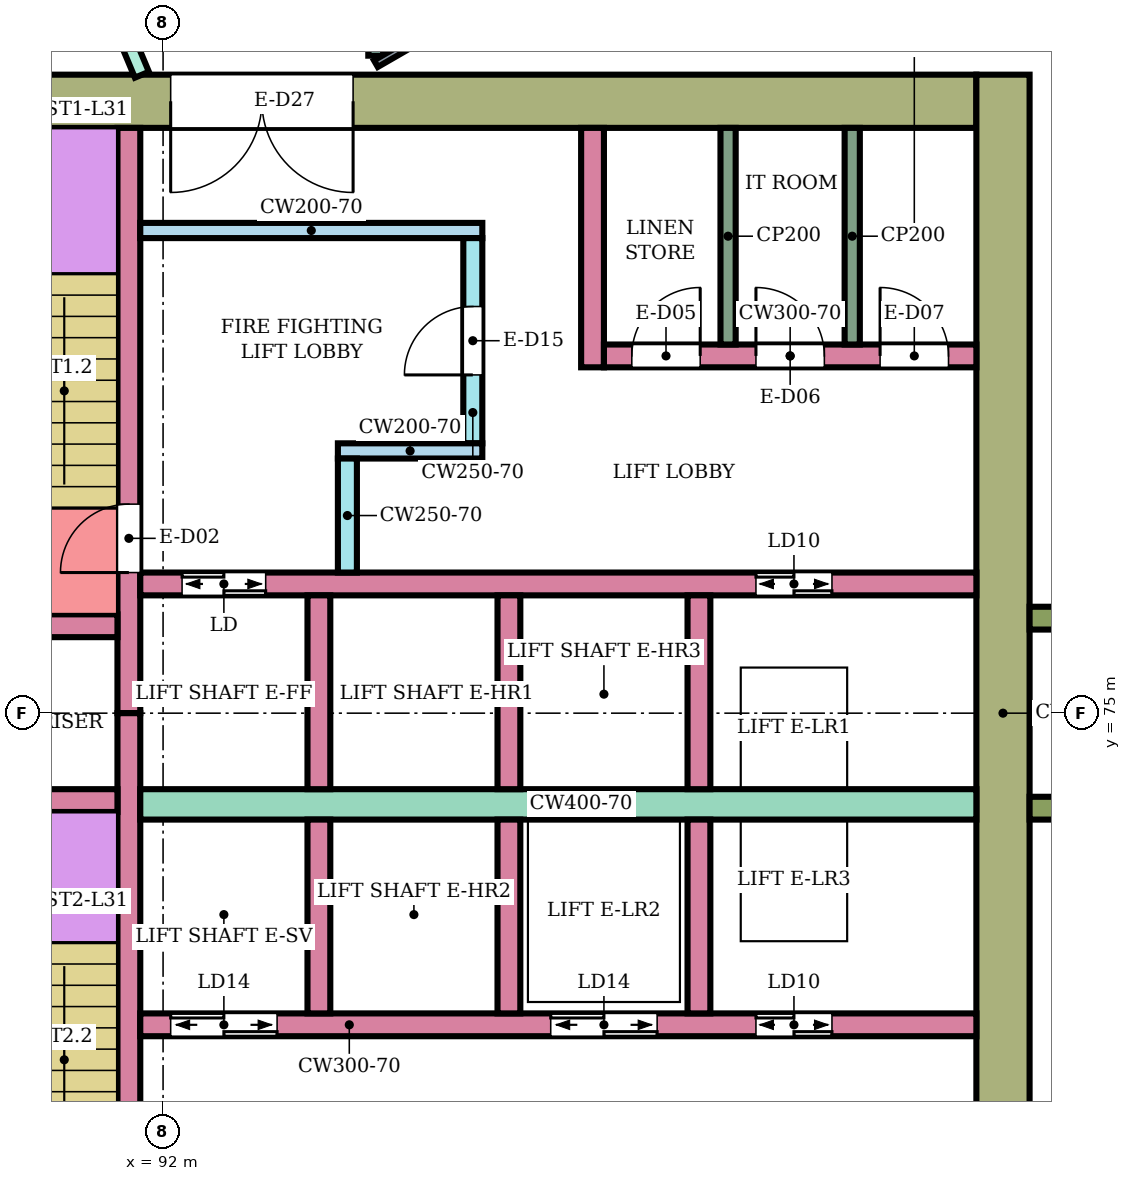
"""IFC4 building model, lengths in metres.
Left out: names, types, materials, properties, quantities, classifications, styles, units other than length and angle.
Written with IfcOpenShell. Run it as: python <this file> out.ifc"""

import sys

from ifc_helpers import new_model, si_unit, direction, frame, frame_2d, origin, place, context, subcontext, project, spatial, rectangle, extrude, element, fill, save


model = new_model("IFC4")
c1 = context("Model", 3, precision=1e-05, world=origin(), true_north=direction((0.0, 1.0)))
c2 = subcontext(c1, "Body", "Model", "MODEL_VIEW")
j1 = project(units=[si_unit("LENGTHUNIT", "METRE"), si_unit("PLANEANGLEUNIT", "RADIAN")], contexts=[c1])
p1 = place(None, origin())
s1 = spatial("IfcSite", under=j1, at=p1, CompositionType="ELEMENT")
p2 = place(p1, origin())
s2 = spatial("IfcBuilding", under=s1, at=p2, CompositionType="ELEMENT")
p3 = place(p2, frame((0.0, 0.0, 134.1)))
s3 = spatial("IfcBuildingStorey", under=s2, at=p3, CompositionType="ELEMENT", Elevation=134.1)
p4 = place(p3, frame((87.9, 83.05, 0.0), z_axis=(0.0, 0.0, 1.0), x_axis=(1.0, 0.0, 0.0)))
e1 = element("IfcWall", 1, at=p4, inside=s3, PredefinedType="SHEAR", context=c2, shape_type="SweptSolid", body=[
    extrude(rectangle(XDim=14.8, YDim=0.7, at=frame_2d((7.4, 0.0))), origin(), (0.0, 0.0, 1.0), 3.58),
])
p5 = place(p4, frame((4.2, 0.0, 0.0)))
e2 = element("IfcOpeningElement", 2, at=p5, cuts=e1, PredefinedType="OPENING", context=c2, shape_type="SweptSolid", body=[
    extrude(rectangle(XDim=2.4, YDim=2.4, at=frame_2d((1.2, 1.2))), frame((0.0, 0.36, 0.0), z_axis=(0.0, -1.0, 0.0), x_axis=(1.0, 0.0, 0.0)), (0.0, 0.0, 1.0), 0.72),
])
p6 = place(p3, frame((103.05, 66.6, 0.0), z_axis=(0.0, 0.0, 1.0), x_axis=(0.0, 1.0, 0.0)))
e3 = element("IfcWall", 3, at=p6, inside=s3, PredefinedType="SHEAR", context=c2, shape_type="SweptSolid", body=[
    extrude(rectangle(XDim=16.8, YDim=0.7, at=frame_2d((8.4, 0.0))), origin(), (0.0, 0.0, 1.0), 3.58),
])
p7 = place(p3, frame((91.55, 75.0, 0.0), z_axis=(0.0, 0.0, 1.0), x_axis=(0.0, 1.0, 0.0)))
e4 = element("IfcWall", 4, at=p7, inside=s3, PredefinedType="SHEAR", context=c2, shape_type="SweptSolid", body=[
    extrude(rectangle(XDim=7.7, YDim=0.3, at=frame_2d((3.85, 0.0))), origin(), (0.0, 0.0, 1.0), 3.58),
])
p8 = place(p7, frame((1.85, 0.0, 0.0)))
e5 = element("IfcOpeningElement", 5, at=p8, cuts=e4, PredefinedType="OPENING", context=c2, shape_type="SweptSolid", body=[
    extrude(rectangle(XDim=0.9, YDim=2.1, at=frame_2d((0.45, 1.05))), frame((0.0, 0.16, 0.0), z_axis=(0.0, -1.0, 0.0), x_axis=(1.0, 0.0, 0.0)), (0.0, 0.0, 1.0), 0.32),
])
p9 = place(p3, frame((91.55, 67.3, 0.0), z_axis=(0.0, 0.0, 1.0), x_axis=(0.0, 1.0, 0.0)))
e6 = element("IfcWall", 6, at=p9, inside=s3, PredefinedType="SHEAR", context=c2, shape_type="SweptSolid", body=[
    extrude(rectangle(XDim=7.7, YDim=0.3, at=frame_2d((3.85, 0.0))), origin(), (0.0, 0.0, 1.0), 3.58),
])
p10 = place(p9, frame((0.35, 0.0, 0.0)))
e7 = element("IfcOpeningElement", 7, at=p10, cuts=e6, PredefinedType="OPENING", context=c2, shape_type="SweptSolid", body=[
    extrude(rectangle(XDim=0.9, YDim=2.1, at=frame_2d((0.45, 1.05))), frame((0.0, 0.16, 0.0), z_axis=(0.0, -1.0, 0.0), x_axis=(1.0, 0.0, 0.0)), (0.0, 0.0, 1.0), 0.32),
])
p11 = place(p3, frame((88.35, 76.15, 0.0), z_axis=(0.0, 0.0, 1.0), x_axis=(1.0, 0.0, 0.0)))
e8 = element("IfcWall", 8, at=p11, inside=s3, PredefinedType="SHEAR", context=c2, shape_type="SweptSolid", body=[
    extrude(rectangle(XDim=3.05, YDim=0.3, at=frame_2d((1.525, 0.0))), origin(), (0.0, 0.0, 1.0), 3.58),
])
p12 = place(p11, frame((1.1, 0.0, 0.0)))
e9 = element("IfcOpeningElement", 9, at=p12, cuts=e8, PredefinedType="OPENING", context=c2, shape_type="SweptSolid", body=[
    extrude(rectangle(XDim=0.7, YDim=2.0, at=frame_2d((0.35, 1.0))), frame((0.0, 0.16, 0.0), z_axis=(0.0, -1.0, 0.0), x_axis=(1.0, 0.0, 0.0)), (0.0, 0.0, 1.0), 0.32),
])
p13 = place(p3, frame((88.35, 73.85, 0.0), z_axis=(0.0, 0.0, 1.0), x_axis=(1.0, 0.0, 0.0)))
e10 = element("IfcWall", 10, at=p13, inside=s3, PredefinedType="SHEAR", context=c2, shape_type="SweptSolid", body=[
    extrude(rectangle(XDim=3.05, YDim=0.3, at=frame_2d((1.525, 0.0))), origin(), (0.0, 0.0, 1.0), 3.58),
])
p14 = place(p3, frame((91.7, 76.7, 0.0), z_axis=(0.0, 0.0, 1.0), x_axis=(1.0, 0.0, 0.0)))
e11 = element("IfcWall", 11, at=p14, inside=s3, PredefinedType="SHEAR", context=c2, shape_type="SweptSolid", body=[
    extrude(rectangle(XDim=11.0, YDim=0.3, at=frame_2d((5.5, 0.0))), origin(), (0.0, 0.0, 1.0), 3.58),
])
p15 = place(p14, frame((0.55, 0.0, 0.0)))
e12 = element("IfcOpeningElement", 12, at=p15, cuts=e11, PredefinedType="OPENING", context=c2, shape_type="SweptSolid", body=[
    extrude(rectangle(XDim=1.1, YDim=2.1, at=frame_2d((0.55, 1.05))), frame((0.0, 0.16, 0.0), z_axis=(0.0, -1.0, 0.0), x_axis=(1.0, 0.0, 0.0)), (0.0, 0.0, 1.0), 0.32),
])
p16 = place(p14, frame((8.1, 0.0, 0.0)))
e13 = element("IfcOpeningElement", 13, at=p16, cuts=e11, PredefinedType="OPENING", context=c2, shape_type="SweptSolid", body=[
    extrude(rectangle(XDim=1.0, YDim=2.1, at=frame_2d((0.5, 1.05))), frame((0.0, 0.16, 0.0), z_axis=(0.0, -1.0, 0.0), x_axis=(1.0, 0.0, 0.0)), (0.0, 0.0, 1.0), 0.32),
])
p17 = place(p3, frame((91.7, 73.8, 0.0), z_axis=(0.0, 0.0, 1.0), x_axis=(1.0, 0.0, 0.0)))
e14 = element("IfcWall", 14, at=p17, inside=s3, PredefinedType="SHEAR", context=c2, shape_type="SweptSolid", body=[
    extrude(rectangle(XDim=11.0, YDim=0.4, at=frame_2d((5.5, 0.0))), origin(), (0.0, 0.0, 1.0), 3.58),
])
p18 = place(p3, frame((91.7, 70.9, 0.0), z_axis=(0.0, 0.0, 1.0), x_axis=(1.0, 0.0, 0.0)))
e15 = element("IfcWall", 15, at=p18, inside=s3, PredefinedType="SHEAR", context=c2, shape_type="SweptSolid", body=[
    extrude(rectangle(XDim=11.0, YDim=0.3, at=frame_2d((5.5, 0.0))), origin(), (0.0, 0.0, 1.0), 3.58),
])
p19 = place(p18, frame((0.4, 0.0, 0.0)))
e16 = element("IfcOpeningElement", 16, at=p19, cuts=e15, PredefinedType="OPENING", context=c2, shape_type="SweptSolid", body=[
    extrude(rectangle(XDim=1.4, YDim=2.1, at=frame_2d((0.7, 1.05))), frame((0.0, 0.16, 0.0), z_axis=(0.0, -1.0, 0.0), x_axis=(1.0, 0.0, 0.0)), (0.0, 0.0, 1.0), 0.32),
])
p20 = place(p18, frame((5.4, 0.0, 0.0)))
e17 = element("IfcOpeningElement", 17, at=p20, cuts=e15, PredefinedType="OPENING", context=c2, shape_type="SweptSolid", body=[
    extrude(rectangle(XDim=1.4, YDim=2.1, at=frame_2d((0.7, 1.05))), frame((0.0, 0.16, 0.0), z_axis=(0.0, -1.0, 0.0), x_axis=(1.0, 0.0, 0.0)), (0.0, 0.0, 1.0), 0.32),
])
p21 = place(p18, frame((8.1, 0.0, 0.0)))
e18 = element("IfcOpeningElement", 18, at=p21, cuts=e15, PredefinedType="OPENING", context=c2, shape_type="SweptSolid", body=[
    extrude(rectangle(XDim=1.0, YDim=2.1, at=frame_2d((0.5, 1.05))), frame((0.0, 0.16, 0.0), z_axis=(0.0, -1.0, 0.0), x_axis=(1.0, 0.0, 0.0)), (0.0, 0.0, 1.0), 0.32),
])
for number, where, z_axis, x_axis in (
    (19, (94.05, 74.0, 0.0), (0.0, 0.0, 1.0), (0.0, 1.0, 0.0)),
    (20, (96.55, 74.0, 0.0), (0.0, 0.0, 1.0), (0.0, 1.0, 0.0)),
    (21, (99.05, 74.0, 0.0), (0.0, 0.0, 1.0), (0.0, 1.0, 0.0)),
    (22, (94.05, 71.05, 0.0), (0.0, 0.0, 1.0), (0.0, 1.0, 0.0)),
    (23, (96.55, 71.05, 0.0), (0.0, 0.0, 1.0), (0.0, 1.0, 0.0)),
    (24, (99.05, 71.05, 0.0), (0.0, 0.0, 1.0), (0.0, 1.0, 0.0)),
):
    element("IfcWall", number, at=place(p3, frame(where, z_axis=z_axis, x_axis=x_axis)), inside=s3, PredefinedType="SHEAR", context=c2, shape_type="SweptSolid", body=[
        extrude(rectangle(XDim=2.55, YDim=0.3, at=frame_2d((1.275, 0.0))), origin(), (0.0, 0.0, 1.0), 3.58),
    ])
p22 = place(p3, frame((91.7, 81.35, 0.0), z_axis=(0.0, 0.0, 1.0), x_axis=(1.0, 0.0, 0.0)))
e25 = element("IfcWall", 25, at=p22, inside=s3, PredefinedType="SHEAR", context=c2, shape_type="SweptSolid", body=[
    extrude(rectangle(XDim=4.5, YDim=0.2, at=frame_2d((2.25, 0.0))), origin(), (0.0, 0.0, 1.0), 3.58),
])
p23 = place(p3, frame((96.075, 78.55, 0.0), z_axis=(0.0, 0.0, 1.0), x_axis=(0.0, 1.0, 0.0)))
e26 = element("IfcWall", 26, at=p23, inside=s3, PredefinedType="SHEAR", context=c2, shape_type="SweptSolid", body=[
    extrude(rectangle(XDim=2.7, YDim=0.25, at=frame_2d((1.35, 0.0))), origin(), (0.0, 0.0, 1.0), 3.58),
])
p24 = place(p23, frame((0.9, 0.0, 0.0)))
e27 = element("IfcOpeningElement", 27, at=p24, cuts=e26, PredefinedType="OPENING", context=c2, shape_type="SweptSolid", body=[
    extrude(rectangle(XDim=0.9, YDim=2.1, at=frame_2d((0.45, 1.05))), frame((0.0, 0.135, 0.0), z_axis=(0.0, -1.0, 0.0), x_axis=(1.0, 0.0, 0.0)), (0.0, 0.0, 1.0), 0.27),
])
p25 = place(p3, frame((94.3, 78.45, 0.0), z_axis=(0.0, 0.0, 1.0), x_axis=(1.0, 0.0, 0.0)))
e28 = element("IfcWall", 28, at=p25, inside=s3, PredefinedType="SHEAR", context=c2, shape_type="SweptSolid", body=[
    extrude(rectangle(XDim=1.9, YDim=0.2, at=frame_2d((0.95, 0.0))), origin(), (0.0, 0.0, 1.0), 3.58),
])
p26 = place(p3, frame((94.425, 76.85, 0.0), z_axis=(0.0, 0.0, 1.0), x_axis=(0.0, 1.0, 0.0)))
e29 = element("IfcWall", 29, at=p26, inside=s3, PredefinedType="SHEAR", context=c2, shape_type="SweptSolid", body=[
    extrude(rectangle(XDim=1.5, YDim=0.25, at=frame_2d((0.75, 0.0))), origin(), (0.0, 0.0, 1.0), 3.58),
])
p27 = place(p3, frame((97.65, 79.55, 0.0), z_axis=(0.0, 0.0, 1.0), x_axis=(0.0, 1.0, 0.0)))
e30 = element("IfcWall", 30, at=p27, inside=s3, PredefinedType="SHEAR", context=c2, shape_type="SweptSolid", body=[
    extrude(rectangle(XDim=3.15, YDim=0.3, at=frame_2d((1.575, 0.0))), origin(), (0.0, 0.0, 1.0), 3.58),
])
p28 = place(p3, frame((97.8, 79.7, 0.0), z_axis=(0.0, 0.0, 1.0), x_axis=(1.0, 0.0, 0.0)))
e31 = element("IfcWall", 31, at=p28, inside=s3, PredefinedType="SHEAR", context=c2, shape_type="SweptSolid", body=[
    extrude(rectangle(XDim=4.9, YDim=0.3, at=frame_2d((2.45, 0.0))), origin(), (0.0, 0.0, 1.0), 3.58),
])
p29 = place(p28, frame((0.367, 0.0, 0.0)))
e32 = element("IfcOpeningElement", 32, at=p29, cuts=e31, PredefinedType="OPENING", context=c2, shape_type="SweptSolid", body=[
    extrude(rectangle(XDim=0.9, YDim=2.1, at=frame_2d((0.45, 1.05))), frame((0.0, 0.16, 0.0), z_axis=(0.0, -1.0, 0.0), x_axis=(1.0, 0.0, 0.0)), (0.0, 0.0, 1.0), 0.32),
])
p30 = place(p28, frame((2.0, 0.0, 0.0)))
e33 = element("IfcOpeningElement", 33, at=p30, cuts=e31, PredefinedType="OPENING", context=c2, shape_type="SweptSolid", body=[
    extrude(rectangle(XDim=0.9, YDim=2.1, at=frame_2d((0.45, 1.05))), frame((0.0, 0.16, 0.0), z_axis=(0.0, -1.0, 0.0), x_axis=(1.0, 0.0, 0.0)), (0.0, 0.0, 1.0), 0.32),
])
p31 = place(p28, frame((3.633, 0.0, 0.0)))
e34 = element("IfcOpeningElement", 34, at=p31, cuts=e31, PredefinedType="OPENING", context=c2, shape_type="SweptSolid", body=[
    extrude(rectangle(XDim=0.9, YDim=2.1, at=frame_2d((0.45, 1.05))), frame((0.0, 0.16, 0.0), z_axis=(0.0, -1.0, 0.0), x_axis=(1.0, 0.0, 0.0)), (0.0, 0.0, 1.0), 0.32),
])
for number, where, z_axis, x_axis in (
    (35, (103.4, 73.75, 0.0), (0.0, 0.0, 1.0), (1.0, 0.0, 0.0)),
    (36, (103.4, 76.25, 0.0), (0.0, 0.0, 1.0), (1.0, 0.0, 0.0)),
):
    element("IfcWall", number, at=place(p3, frame(where, z_axis=z_axis, x_axis=x_axis)), inside=s3, PredefinedType="NOTDEFINED", context=c2, shape_type="SweptSolid", body=[
        extrude(rectangle(XDim=2.416, YDim=0.3, at=frame_2d((1.208, 0.0))), origin(), (0.0, 0.0, 1.0), 3.9),
    ])
p32 = place(p3, frame((88.698, 90.624, 0.0), z_axis=(0.0, 0.0, 1.0), x_axis=(0.386027055918, -0.922487459047, 0.0)))
e37 = element("IfcWall", 37, at=p32, inside=s3, PredefinedType="PARTITIONING", context=c2, shape_type="SweptSolid", body=[
    extrude(rectangle(XDim=7.832, YDim=0.2, at=frame_2d((3.916, 0.0))), origin(), (0.0, 0.0, 1.0), 3.45),
])
p33 = place(p32, frame((1.482, 0.0, 0.0)))
e38 = element("IfcOpeningElement", 38, at=p33, cuts=e37, PredefinedType="OPENING", context=c2, shape_type="SweptSolid", body=[
    extrude(rectangle(XDim=1.0, YDim=2.1, at=frame_2d((0.5, 1.05))), frame((0.0, 0.11, 0.0), z_axis=(0.0, -1.0, 0.0), x_axis=(1.0, 0.0, 0.0)), (0.0, 0.0, 1.0), 0.22),
])
p34 = place(p3, frame((94.8, 83.65, 0.0), z_axis=(0.0, 0.0, 1.0), x_axis=(0.0, 1.0, 0.0)))
e39 = element("IfcWall", 39, at=p34, inside=s3, PredefinedType="PARTITIONING", context=c2, shape_type="SweptSolid", body=[
    extrude(rectangle(XDim=1.25, YDim=0.2, at=frame_2d((0.625, 0.0))), origin(), (0.0, 0.0, 1.0), 3.45),
])
p35 = place(p34, frame((0.062, 0.0, 0.0)))
e40 = element("IfcOpeningElement", 40, at=p35, cuts=e39, PredefinedType="OPENING", context=c2, shape_type="SweptSolid", body=[
    extrude(rectangle(XDim=1.0, YDim=2.1, at=frame_2d((0.5, 1.05))), frame((0.0, 0.11, 0.0), z_axis=(0.0, -1.0, 0.0), x_axis=(1.0, 0.0, 0.0)), (0.0, 0.0, 1.0), 0.22),
])
p36 = place(p3, frame((94.8, 83.545, 0.0), z_axis=(0.0, 0.0, 1.0), x_axis=(0.86602264145, 0.500004784474, 0.0)))
e41 = element("IfcWall", 41, at=p36, inside=s3, PredefinedType="PARTITIONING", context=c2, shape_type="SweptSolid", body=[
    extrude(rectangle(XDim=8.708, YDim=0.1, at=frame_2d((4.354, 0.0))), origin(), (0.0, 0.0, 1.0), 3.45),
])
p37 = place(p36, frame((3.879, 0.0, 0.0)))
e42 = element("IfcOpeningElement", 42, at=p37, cuts=e41, PredefinedType="OPENING", context=c2, shape_type="SweptSolid", body=[
    extrude(rectangle(XDim=0.9, YDim=2.1, at=frame_2d((0.45, 1.05))), frame((0.0, 0.06, 0.0), z_axis=(0.0, -1.0, 0.0), x_axis=(1.0, 0.0, 0.0)), (0.0, 0.0, 1.0), 0.12),
])
for number, where, z_axis, x_axis in (
    (43, (99.433, 79.85, 0.0), (0.0, 0.0, 1.0), (0.0, 1.0, 0.0)),
    (44, (101.067, 79.85, 0.0), (0.0, 0.0, 1.0), (0.0, 1.0, 0.0)),
):
    element("IfcWall", number, at=place(p3, frame(where, z_axis=z_axis, x_axis=x_axis)), inside=s3, PredefinedType="PARTITIONING", context=c2, shape_type="SweptSolid", body=[
        extrude(rectangle(XDim=2.85, YDim=0.2, at=frame_2d((1.425, 0.0))), origin(), (0.0, 0.0, 1.0), 3.58),
    ])
p38 = place(p8, origin())
e45 = element("IfcDoor", 45, at=p38, inside=s3, OperationType="SINGLE_SWING_LEFT", PredefinedType="DOOR", context=c2, shape_type="SweptSolid", body=[
    extrude(rectangle(XDim=0.9, YDim=2.1, at=frame_2d((0.45, 1.05))), frame((0.0, 0.025, 0.0), z_axis=(0.0, -1.0, 0.0), x_axis=(1.0, 0.0, 0.0)), (0.0, 0.0, 1.0), 0.05),
])
fill(e5, e45)
p39 = place(p15, origin())
e46 = element("IfcDoor", 46, at=p39, inside=s3, OperationType="DOUBLE_DOOR_SLIDING", PredefinedType="DOOR", context=c2, shape_type="SweptSolid", body=[
    extrude(rectangle(XDim=1.1, YDim=2.1, at=frame_2d((0.55, 1.05))), frame((0.0, 0.025, 0.0), z_axis=(0.0, -1.0, 0.0), x_axis=(1.0, 0.0, 0.0)), (0.0, 0.0, 1.0), 0.05),
])
fill(e12, e46)
p40 = place(p16, origin())
e47 = element("IfcDoor", 47, at=p40, inside=s3, OperationType="DOUBLE_DOOR_SLIDING", PredefinedType="DOOR", context=c2, shape_type="SweptSolid", body=[
    extrude(rectangle(XDim=1.0, YDim=2.1, at=frame_2d((0.5, 1.05))), frame((0.0, 0.025, 0.0), z_axis=(0.0, -1.0, 0.0), x_axis=(1.0, 0.0, 0.0)), (0.0, 0.0, 1.0), 0.05),
])
fill(e13, e47)
p41 = place(p19, origin())
e48 = element("IfcDoor", 48, at=p41, inside=s3, OperationType="DOUBLE_DOOR_SLIDING", PredefinedType="DOOR", context=c2, shape_type="SweptSolid", body=[
    extrude(rectangle(XDim=1.4, YDim=2.1, at=frame_2d((0.7, 1.05))), frame((0.0, 0.025, 0.0), z_axis=(0.0, -1.0, 0.0), x_axis=(1.0, 0.0, 0.0)), (0.0, 0.0, 1.0), 0.05),
])
fill(e16, e48)
p42 = place(p20, origin())
e49 = element("IfcDoor", 49, at=p42, inside=s3, OperationType="DOUBLE_DOOR_SLIDING", PredefinedType="DOOR", context=c2, shape_type="SweptSolid", body=[
    extrude(rectangle(XDim=1.4, YDim=2.1, at=frame_2d((0.7, 1.05))), frame((0.0, 0.025, 0.0), z_axis=(0.0, -1.0, 0.0), x_axis=(1.0, 0.0, 0.0)), (0.0, 0.0, 1.0), 0.05),
])
fill(e17, e49)
p43 = place(p21, origin())
e50 = element("IfcDoor", 50, at=p43, inside=s3, OperationType="DOUBLE_DOOR_SLIDING", PredefinedType="DOOR", context=c2, shape_type="SweptSolid", body=[
    extrude(rectangle(XDim=1.0, YDim=2.1, at=frame_2d((0.5, 1.05))), frame((0.0, 0.025, 0.0), z_axis=(0.0, -1.0, 0.0), x_axis=(1.0, 0.0, 0.0)), (0.0, 0.0, 1.0), 0.05),
])
fill(e18, e50)
p44 = place(p24, origin())
e51 = element("IfcDoor", 51, at=p44, inside=s3, OperationType="SINGLE_SWING_LEFT", PredefinedType="DOOR", context=c2, shape_type="SweptSolid", body=[
    extrude(rectangle(XDim=0.9, YDim=2.1, at=frame_2d((0.45, 1.05))), frame((0.0, 0.025, 0.0), z_axis=(0.0, -1.0, 0.0), x_axis=(1.0, 0.0, 0.0)), (0.0, 0.0, 1.0), 0.05),
])
fill(e27, e51)
p45 = place(p29, origin())
e52 = element("IfcDoor", 52, at=p45, inside=s3, OperationType="SINGLE_SWING_RIGHT", PredefinedType="DOOR", context=c2, shape_type="SweptSolid", body=[
    extrude(rectangle(XDim=0.9, YDim=2.1, at=frame_2d((0.45, 1.05))), frame((0.0, 0.025, 0.0), z_axis=(0.0, -1.0, 0.0), x_axis=(1.0, 0.0, 0.0)), (0.0, 0.0, 1.0), 0.05),
])
fill(e32, e52)
p46 = place(p30, origin())
e53 = element("IfcDoor", 53, at=p46, inside=s3, OperationType="SINGLE_SWING_LEFT", PredefinedType="DOOR", context=c2, shape_type="SweptSolid", body=[
    extrude(rectangle(XDim=0.9, YDim=2.1, at=frame_2d((0.45, 1.05))), frame((0.0, 0.025, 0.0), z_axis=(0.0, -1.0, 0.0), x_axis=(1.0, 0.0, 0.0)), (0.0, 0.0, 1.0), 0.05),
])
fill(e33, e53)
p47 = place(p31, origin())
e54 = element("IfcDoor", 54, at=p47, inside=s3, OperationType="SINGLE_SWING_LEFT", PredefinedType="DOOR", context=c2, shape_type="SweptSolid", body=[
    extrude(rectangle(XDim=0.9, YDim=2.1, at=frame_2d((0.45, 1.05))), frame((0.0, 0.025, 0.0), z_axis=(0.0, -1.0, 0.0), x_axis=(1.0, 0.0, 0.0)), (0.0, 0.0, 1.0), 0.05),
])
fill(e34, e54)
p48 = place(p5, frame((2.4, 0.0, 0.0), z_axis=(0.0, 0.0, 1.0), x_axis=(-1.0, 0.0, 0.0)))
e55 = element("IfcDoor", 55, at=p48, inside=s3, OperationType="DOUBLE_DOOR_SINGLE_SWING", PredefinedType="DOOR", context=c2, shape_type="SweptSolid", body=[
    extrude(rectangle(XDim=2.4, YDim=2.4, at=frame_2d((1.2, 1.2))), frame((0.0, 0.025, 0.0), z_axis=(0.0, -1.0, 0.0), x_axis=(1.0, 0.0, 0.0)), (0.0, 0.0, 1.0), 0.05),
])
fill(e2, e55)
save(model, sys.argv[1])
